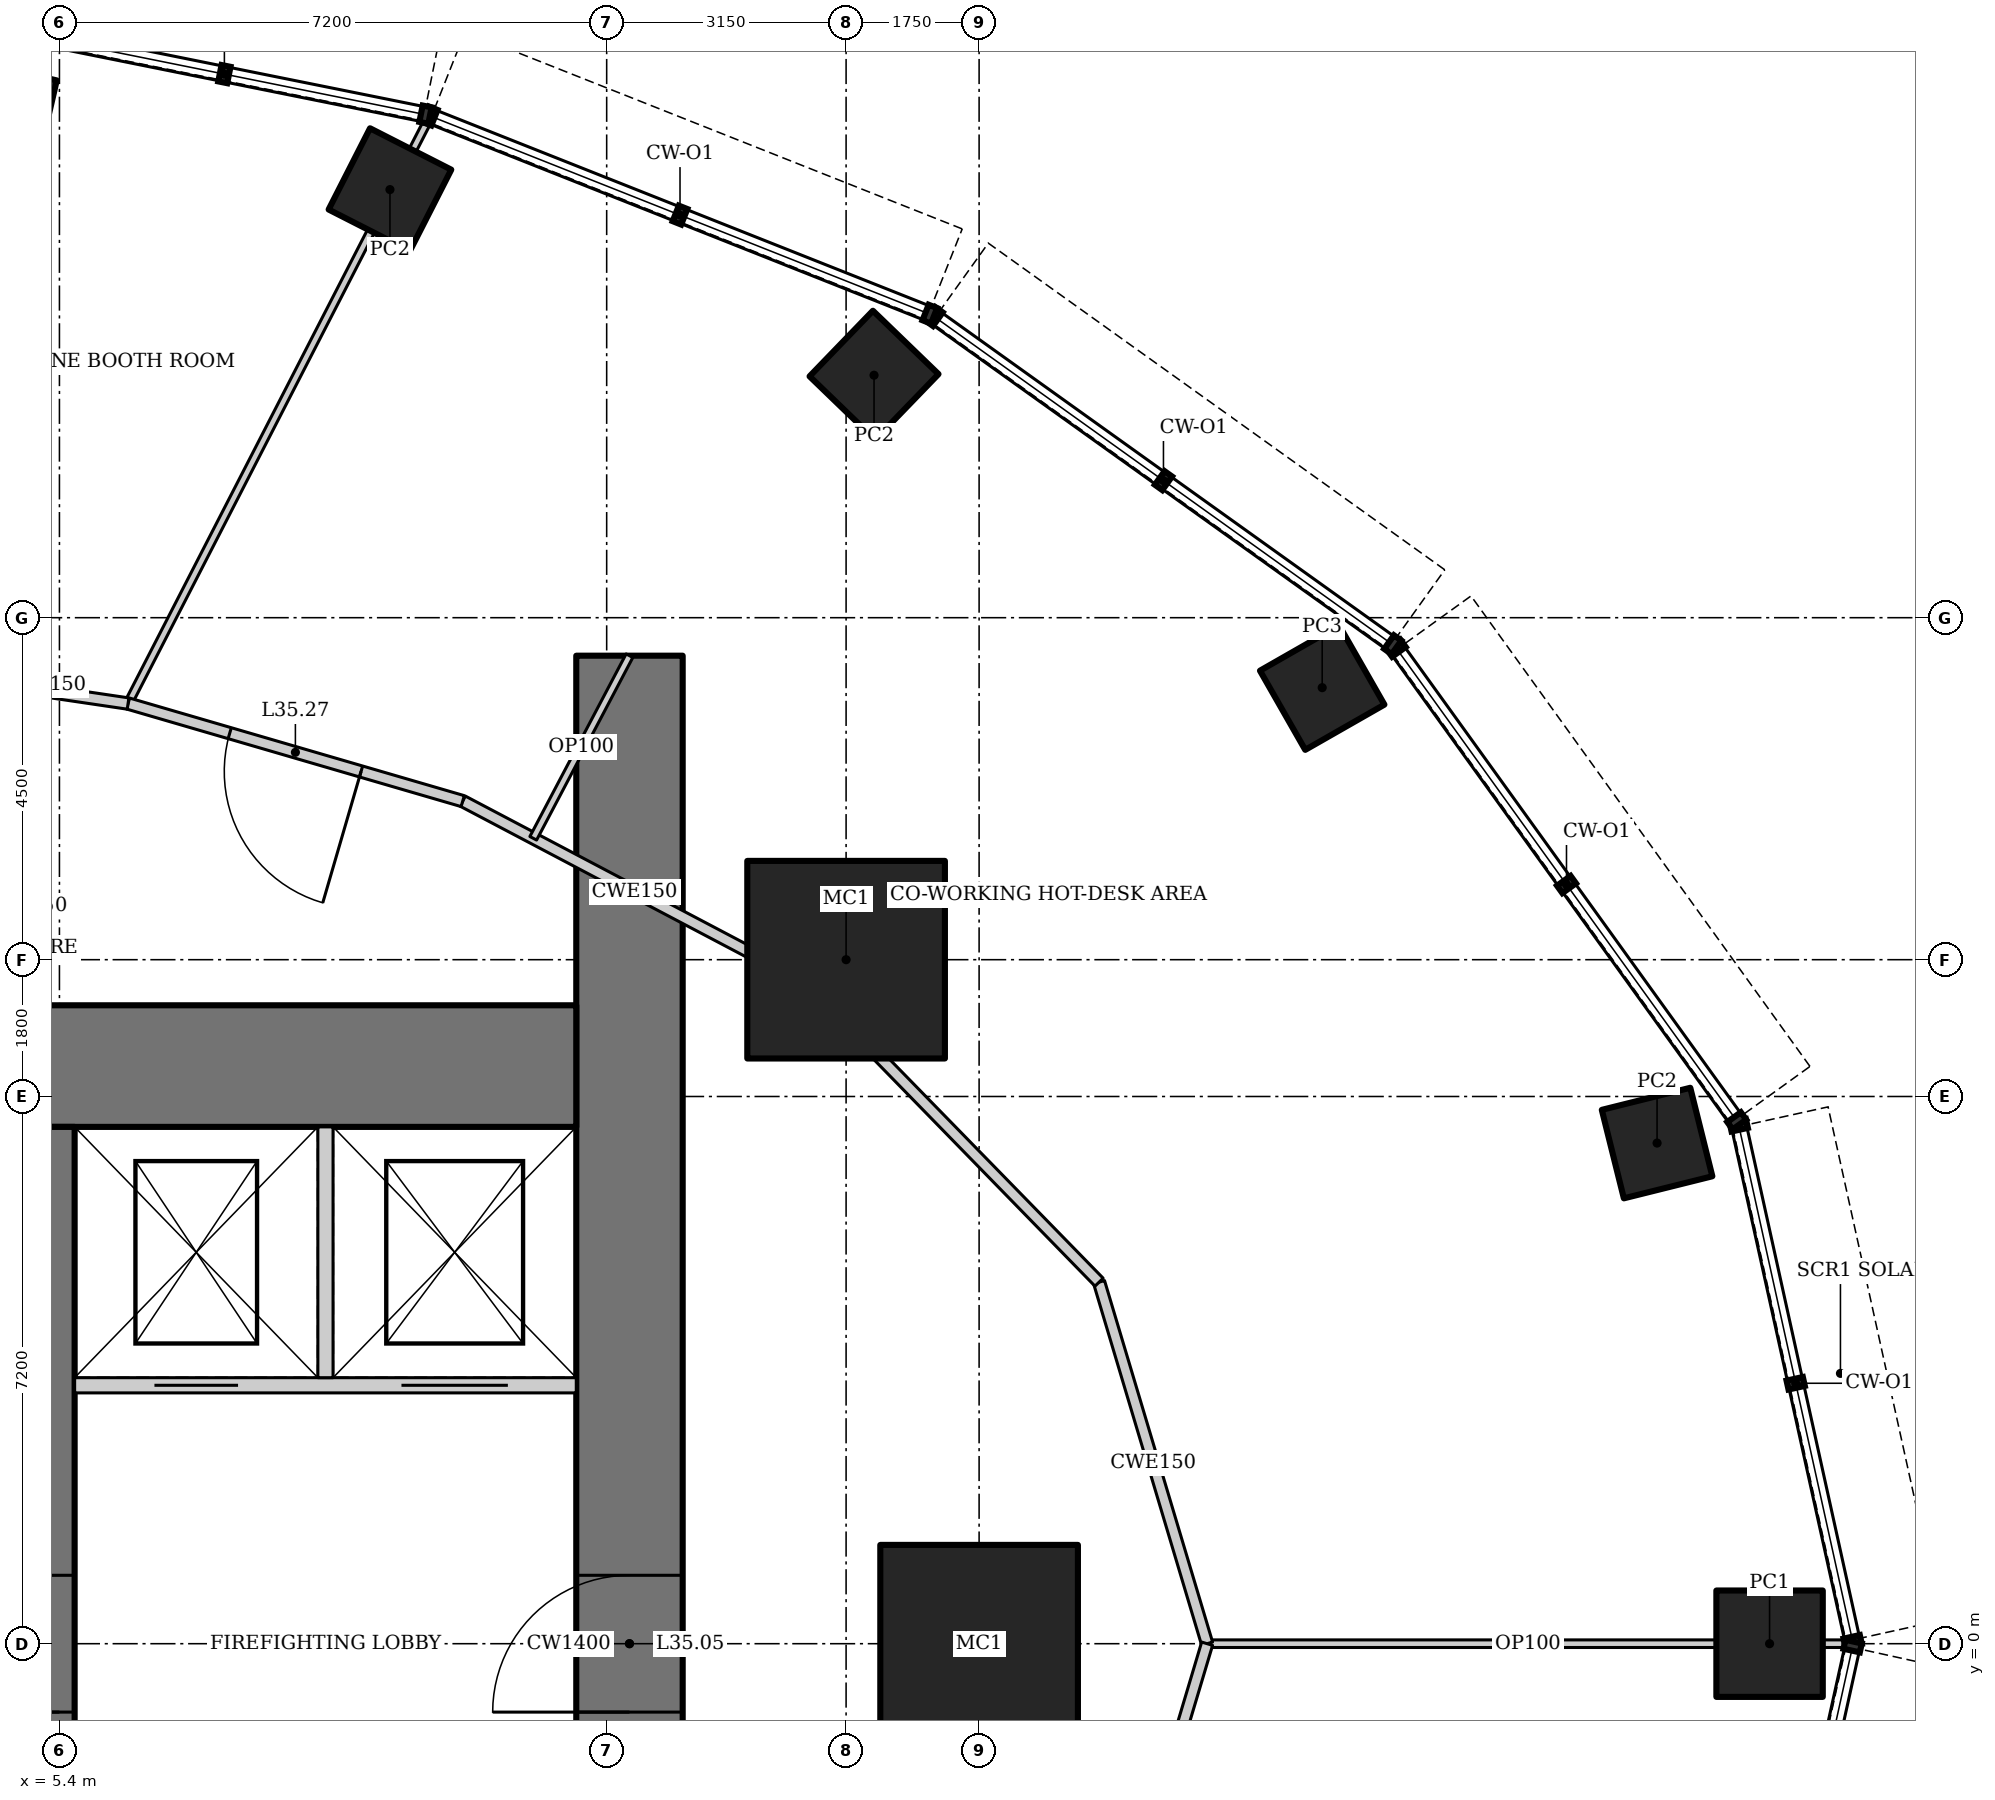
"""IFC4 building model, lengths in metres.
Left out: names, types, materials, properties, quantities, classifications, styles, units other than length and angle.
Written with IfcOpenShell. Run it as: python <this file> out.ifc"""

import sys

from ifc_helpers import new_model, si_unit, direction, frame, frame_2d, origin, origin_2d, place, context, subcontext, project, spatial, rectangle, hollow_rectangle, extrude, element, fill, save


model = new_model("IFC4")
c1 = context("Model", 3, precision=1e-05, world=origin(), true_north=direction((0.0, 1.0)))
c2 = subcontext(c1, "Body", "Model", "MODEL_VIEW")
j1 = project(units=[si_unit("LENGTHUNIT", "METRE"), si_unit("PLANEANGLEUNIT", "RADIAN")], contexts=[c1])
p1 = place(None, origin())
s1 = spatial("IfcSite", under=j1, at=p1, CompositionType="ELEMENT")
p2 = place(p1, origin())
s2 = spatial("IfcBuilding", under=s1, at=p2, CompositionType="ELEMENT")
p3 = place(p2, frame((0.0, 0.0, 151.0)))
s3 = spatial("IfcBuildingStorey", under=s2, at=p3, CompositionType="ELEMENT", Elevation=151.0)
for number, where, z_axis, x_axis in (
    (1, (17.5, 0.0, 0.0), (0.0, 0.0, 1.0), (1.0, 0.0, 0.0)),
    (2, (15.75, 9.0, 0.0), (0.0, 0.0, 1.0), (1.0, 0.0, 0.0)),
):
    element("IfcColumn", number, at=place(p3, frame(where, z_axis=z_axis, x_axis=x_axis)), inside=s3, PredefinedType="COLUMN", context=c2, shape_type="SweptSolid", body=[
        extrude(hollow_rectangle(XDim=2.6, YDim=2.6, WallThickness=0.13, at=origin_2d()), origin(), (0.0, 0.0, 1.0), 4.2),
    ])
p4 = place(p3, frame((27.9, 0.0, 0.0), z_axis=(0.0, 0.0, 1.0), x_axis=(1.0, 0.0, 0.0)))
e3 = element("IfcColumn", 3, at=p4, inside=s3, PredefinedType="COLUMN", context=c2, shape_type="SweptSolid", body=[
    extrude(hollow_rectangle(XDim=1.4, YDim=1.4, WallThickness=0.1, at=origin_2d()), origin(), (0.0, 0.0, 1.0), 4.2),
])
p5 = place(p3, frame((26.42, 6.587, 0.0), z_axis=(0.0, 0.0, 1.0), x_axis=(0.970295726276, 0.2419218956, 0.0)))
e4 = element("IfcColumn", 4, at=p5, inside=s3, PredefinedType="COLUMN", context=c2, shape_type="SweptSolid", body=[
    extrude(hollow_rectangle(XDim=1.2, YDim=1.2, WallThickness=0.1, at=origin_2d()), origin(), (0.0, 0.0, 1.0), 4.2),
])
p6 = place(p3, frame((22.014, 12.579, 0.0), z_axis=(0.0, 0.0, 1.0), x_axis=(0.86824298017, 0.496139221777, 0.0)))
e5 = element("IfcColumn", 5, at=p6, inside=s3, PredefinedType="COLUMN", context=c2, shape_type="SweptSolid", body=[
    extrude(hollow_rectangle(XDim=1.2, YDim=1.2, WallThickness=0.12, at=origin_2d()), origin(), (0.0, 0.0, 1.0), 4.2),
])
for number, where, z_axis, x_axis in (
    (6, (16.118, 16.69, 0.0), (0.0, 0.0, 1.0), (0.695, 0.719, 0.0)),
    (7, (9.749, 19.133, 0.0), (0.0, 0.0, 1.0), (0.454, 0.891, 0.0)),
    (8, (4.645, 20.12, 0.0), (0.0, 0.0, 1.0), (0.225, 0.974, 0.0)),
):
    element("IfcColumn", number, at=place(p3, frame(where, z_axis=z_axis, x_axis=x_axis)), inside=s3, PredefinedType="COLUMN", context=c2, shape_type="SweptSolid", body=[
        extrude(hollow_rectangle(XDim=1.2, YDim=1.2, WallThickness=0.1, at=origin_2d()), origin(), (0.0, 0.0, 1.0), 4.2),
    ])
p7 = place(p3, frame((12.9, -13.0, 0.0), z_axis=(0.0, 0.0, 1.0), x_axis=(0.0, 1.0, 0.0)))
e9 = element("IfcWall", 9, at=p7, inside=s3, PredefinedType="SHEAR", context=c2, shape_type="SweptSolid", body=[
    extrude(rectangle(XDim=26.0, YDim=1.4, at=frame_2d((13.0, 0.0))), origin(), (0.0, 0.0, 1.0), 4.2),
])
p8 = place(p7, frame((12.1, 0.0, 0.0)))
e10 = element("IfcOpeningElement", 10, at=p8, cuts=e9, PredefinedType="OPENING", context=c2, shape_type="SweptSolid", body=[
    extrude(rectangle(XDim=1.8, YDim=2.1, at=frame_2d((0.9, 1.05))), frame((0.0, 0.71, 0.0), z_axis=(0.0, -1.0, 0.0), x_axis=(1.0, 0.0, 0.0)), (0.0, 0.0, 1.0), 1.42),
])
p9 = place(p3, frame((12.2, 7.6, 0.0), z_axis=(0.0, 0.0, 1.0), x_axis=(-1.0, 0.0, 0.0)))
e11 = element("IfcWall", 11, at=p9, inside=s3, PredefinedType="SHEAR", context=c2, shape_type="SweptSolid", body=[
    extrude(rectangle(XDim=24.4, YDim=1.6, at=frame_2d((12.2, 0.0))), origin(), (0.0, 0.0, 1.0), 4.2),
])
p10 = place(p3, frame((5.4, -6.8, 0.0), z_axis=(0.0, 0.0, 1.0), x_axis=(0.0, 1.0, 0.0)))
e12 = element("IfcWall", 12, at=p10, inside=s3, PredefinedType="SHEAR", context=c2, shape_type="SweptSolid", body=[
    extrude(rectangle(XDim=13.6, YDim=0.4, at=frame_2d((6.8, 0.0))), origin(), (0.0, 0.0, 1.0), 4.2),
])
p11 = place(p10, frame((5.9, 0.0, 0.0)))
e13 = element("IfcOpeningElement", 13, at=p11, cuts=e12, PredefinedType="OPENING", context=c2, shape_type="SweptSolid", body=[
    extrude(rectangle(XDim=1.8, YDim=2.1, at=frame_2d((0.9, 1.05))), frame((0.0, 0.21, 0.0), z_axis=(0.0, -1.0, 0.0), x_axis=(1.0, 0.0, 0.0)), (0.0, 0.0, 1.0), 0.42),
])
p12 = place(p3, frame((12.2, 3.4, 0.0), z_axis=(0.0, 0.0, 1.0), x_axis=(-1.0, 0.0, 0.0)))
e14 = element("IfcWall", 14, at=p12, inside=s3, PredefinedType="SOLIDWALL", context=c2, shape_type="SweptSolid", body=[
    extrude(rectangle(XDim=6.6, YDim=0.2, at=frame_2d((3.3, 0.0))), origin(), (0.0, 0.0, 1.0), 4.2),
])
p13 = place(p12, frame((4.45, 0.0, 0.0)))
e15 = element("IfcOpeningElement", 15, at=p13, cuts=e14, PredefinedType="OPENING", context=c2, shape_type="SweptSolid", body=[
    extrude(rectangle(XDim=1.1, YDim=2.2, at=frame_2d((0.55, 1.1))), frame((0.0, 0.11, 0.0), z_axis=(0.0, -1.0, 0.0), x_axis=(1.0, 0.0, 0.0)), (0.0, 0.0, 1.0), 0.22),
])
p14 = place(p12, frame((0.9, 0.0, 0.0)))
e16 = element("IfcOpeningElement", 16, at=p14, cuts=e14, PredefinedType="OPENING", context=c2, shape_type="SweptSolid", body=[
    extrude(rectangle(XDim=1.4, YDim=2.2, at=frame_2d((0.7, 1.1))), frame((0.0, 0.11, 0.0), z_axis=(0.0, -1.0, 0.0), x_axis=(1.0, 0.0, 0.0)), (0.0, 0.0, 1.0), 0.22),
])
p15 = place(p3, frame((8.9, 3.5, 0.0), z_axis=(0.0, 0.0, 1.0), x_axis=(0.0, 1.0, 0.0)))
e17 = element("IfcWall", 17, at=p15, inside=s3, PredefinedType="SOLIDWALL", context=c2, shape_type="SweptSolid", body=[
    extrude(rectangle(XDim=3.3, YDim=0.2, at=frame_2d((1.65, 0.0))), origin(), (0.0, 0.0, 1.0), 4.2),
])
p16 = place(p3, frame((28.944, 0.0, 0.0), z_axis=(0.0, 0.0, 1.0), x_axis=(-1.0, 0.0, 0.0)))
e18 = element("IfcWall", 18, at=p16, inside=s3, PredefinedType="PARTITIONING", context=c2, shape_type="SweptSolid", body=[
    extrude(rectangle(XDim=8.444, YDim=0.1, at=frame_2d((4.222, 0.0))), origin(), (0.0, 0.0, 1.0), 3.204),
])
p17 = place(p3, frame((10.253, 20.052, 0.0), z_axis=(0.0, 0.0, 1.0), x_axis=(-0.457326298316, -0.88929896934, 0.0)))
e19 = element("IfcWall", 19, at=p17, inside=s3, PredefinedType="PARTITIONING", context=c2, shape_type="SweptSolid", body=[
    extrude(rectangle(XDim=8.638, YDim=0.1, at=frame_2d((4.319, 0.0))), origin(), (0.0, 0.0, 1.0), 3.349),
])
p18 = place(p3, frame((20.5, 0.0, 0.0), z_axis=(0.0, 0.0, 1.0), x_axis=(-0.286346182056, 0.958126225516, 0.0)))
e20 = element("IfcWall", 20, at=p18, inside=s3, PredefinedType="PARTITIONING", context=c2, shape_type="SweptSolid", body=[
    extrude(rectangle(XDim=4.965, YDim=0.15, at=frame_2d((2.482, 0.0))), origin(), (0.0, 0.0, 1.0), 4.05),
])
p19 = place(p3, frame((19.078, 4.757, 0.0), z_axis=(0.0, 0.0, 1.0), x_axis=(-0.698305033542, 0.715800307439, 0.0)))
e21 = element("IfcWall", 21, at=p19, inside=s3, PredefinedType="PARTITIONING", context=c2, shape_type="SweptSolid", body=[
    extrude(rectangle(XDim=5.512, YDim=0.15, at=frame_2d((2.756, 0.0))), origin(), (0.0, 0.0, 1.0), 4.05),
])
p20 = place(p3, frame((15.229, 8.702, 0.0), z_axis=(0.0, 0.0, 1.0), x_axis=(-0.884643590306, 0.466267860924, 0.0)))
e22 = element("IfcWall", 22, at=p20, inside=s3, PredefinedType="PARTITIONING", context=c2, shape_type="SweptSolid", body=[
    extrude(rectangle(XDim=5.113, YDim=0.15, at=frame_2d((2.557, 0.0))), origin(), (0.0, 0.0, 1.0), 4.05),
])
p21 = place(p3, frame((10.706, 11.086, 0.0), z_axis=(0.0, 0.0, 1.0), x_axis=(-0.96001728753, 0.279940721659, 0.0)))
e23 = element("IfcWall", 23, at=p21, inside=s3, PredefinedType="PARTITIONING", context=c2, shape_type="SweptSolid", body=[
    extrude(rectangle(XDim=4.586, YDim=0.15, at=frame_2d((2.293, 0.0))), origin(), (0.0, 0.0, 1.0), 4.05),
])
p22 = place(p21, frame((1.393, 0.0, 0.0)))
e24 = element("IfcOpeningElement", 24, at=p22, cuts=e23, PredefinedType="OPENING", context=c2, shape_type="SweptSolid", body=[
    extrude(rectangle(XDim=1.8, YDim=2.1, at=frame_2d((0.9, 1.05))), frame((0.0, 0.085, 0.0), z_axis=(0.0, -1.0, 0.0), x_axis=(1.0, 0.0, 0.0)), (0.0, 0.0, 1.0), 0.17),
])
p23 = place(p3, frame((6.303, 12.37, 0.0), z_axis=(0.0, 0.0, 1.0), x_axis=(-0.989262902935, 0.146146874329, 0.0)))
e25 = element("IfcWall", 25, at=p23, inside=s3, PredefinedType="PARTITIONING", context=c2, shape_type="SweptSolid", body=[
    extrude(rectangle(XDim=3.369, YDim=0.15, at=frame_2d((1.685, 0.0))), origin(), (0.0, 0.0, 1.0), 4.05),
])
p24 = place(p23, frame((2.103, 0.0, 0.0)))
e26 = element("IfcOpeningElement", 26, at=p24, cuts=e25, PredefinedType="OPENING", context=c2, shape_type="SweptSolid", body=[
    extrude(rectangle(XDim=0.9, YDim=2.1, at=frame_2d((0.45, 1.05))), frame((0.0, 0.085, 0.0), z_axis=(0.0, -1.0, 0.0), x_axis=(1.0, 0.0, 0.0)), (0.0, 0.0, 1.0), 0.17),
])
p25 = place(p3, frame((19.078, -4.757, 0.0), z_axis=(0.0, 0.0, 1.0), x_axis=(0.286346182056, 0.958126225516, 0.0)))
e27 = element("IfcWall", 27, at=p25, inside=s3, PredefinedType="PARTITIONING", context=c2, shape_type="SweptSolid", body=[
    extrude(rectangle(XDim=4.965, YDim=0.15, at=frame_2d((2.482, 0.0))), origin(), (0.0, 0.0, 1.0), 4.05),
])
p26 = place(p25, frame((0.15, 0.0, 0.0)))
e28 = element("IfcOpeningElement", 28, at=p26, cuts=e27, PredefinedType="OPENING", context=c2, shape_type="SweptSolid", body=[
    extrude(rectangle(XDim=0.9, YDim=2.1, at=frame_2d((0.45, 1.05))), frame((0.0, 0.085, 0.0), z_axis=(0.0, -1.0, 0.0), x_axis=(1.0, 0.0, 0.0)), (0.0, 0.0, 1.0), 0.17),
])
p27 = place(p3, frame((12.9, 13.0, 0.0), z_axis=(0.0, 0.0, 1.0), x_axis=(-0.466205800243, -0.884676297761, 0.0)))
e29 = element("IfcWall", 29, at=p27, inside=s3, PredefinedType="PARTITIONING", context=c2, shape_type="SweptSolid", body=[
    extrude(rectangle(XDim=2.716, YDim=0.1, at=frame_2d((1.358, 0.0))), origin(), (0.0, 0.0, 1.0), 4.05),
])
p28 = place(p11, origin())
e30 = element("IfcDoor", 30, at=p28, inside=s3, OperationType="DOUBLE_DOOR_DOUBLE_SWING", PredefinedType="DOOR", context=c2, shape_type="SweptSolid", body=[
    extrude(rectangle(XDim=1.8, YDim=2.1, at=frame_2d((0.9, 1.05))), frame((0.0, 0.025, 0.0), z_axis=(0.0, -1.0, 0.0), x_axis=(1.0, 0.0, 0.0)), (0.0, 0.0, 1.0), 0.05),
])
fill(e13, e30)
p29 = place(p8, origin())
e31 = element("IfcDoor", 31, at=p29, inside=s3, OperationType="DOUBLE_DOOR_DOUBLE_SWING", PredefinedType="DOOR", context=c2, shape_type="SweptSolid", body=[
    extrude(rectangle(XDim=1.8, YDim=2.1, at=frame_2d((0.9, 1.05))), frame((0.0, 0.025, 0.0), z_axis=(0.0, -1.0, 0.0), x_axis=(1.0, 0.0, 0.0)), (0.0, 0.0, 1.0), 0.05),
])
fill(e10, e31)
p30 = place(p13, origin())
e32 = element("IfcDoor", 32, at=p30, inside=s3, OperationType="DOUBLE_DOOR_SLIDING", PredefinedType="DOOR", context=c2, shape_type="SweptSolid", body=[
    extrude(rectangle(XDim=1.1, YDim=2.2, at=frame_2d((0.55, 1.1))), frame((0.0, 0.025, 0.0), z_axis=(0.0, -1.0, 0.0), x_axis=(1.0, 0.0, 0.0)), (0.0, 0.0, 1.0), 0.05),
])
fill(e15, e32)
p31 = place(p14, origin())
e33 = element("IfcDoor", 33, at=p31, inside=s3, OperationType="DOUBLE_DOOR_SLIDING", PredefinedType="DOOR", context=c2, shape_type="SweptSolid", body=[
    extrude(rectangle(XDim=1.4, YDim=2.2, at=frame_2d((0.7, 1.1))), frame((0.0, 0.025, 0.0), z_axis=(0.0, -1.0, 0.0), x_axis=(1.0, 0.0, 0.0)), (0.0, 0.0, 1.0), 0.05),
])
fill(e16, e33)
p32 = place(p22, origin())
e34 = element("IfcDoor", 34, at=p32, inside=s3, OperationType="DOUBLE_DOOR_DOUBLE_SWING", PredefinedType="DOOR", context=c2, shape_type="SweptSolid", body=[
    extrude(rectangle(XDim=1.8, YDim=2.1, at=frame_2d((0.9, 1.05))), frame((0.0, 0.025, 0.0), z_axis=(0.0, -1.0, 0.0), x_axis=(1.0, 0.0, 0.0)), (0.0, 0.0, 1.0), 0.05),
])
fill(e24, e34)
save(model, sys.argv[1])
